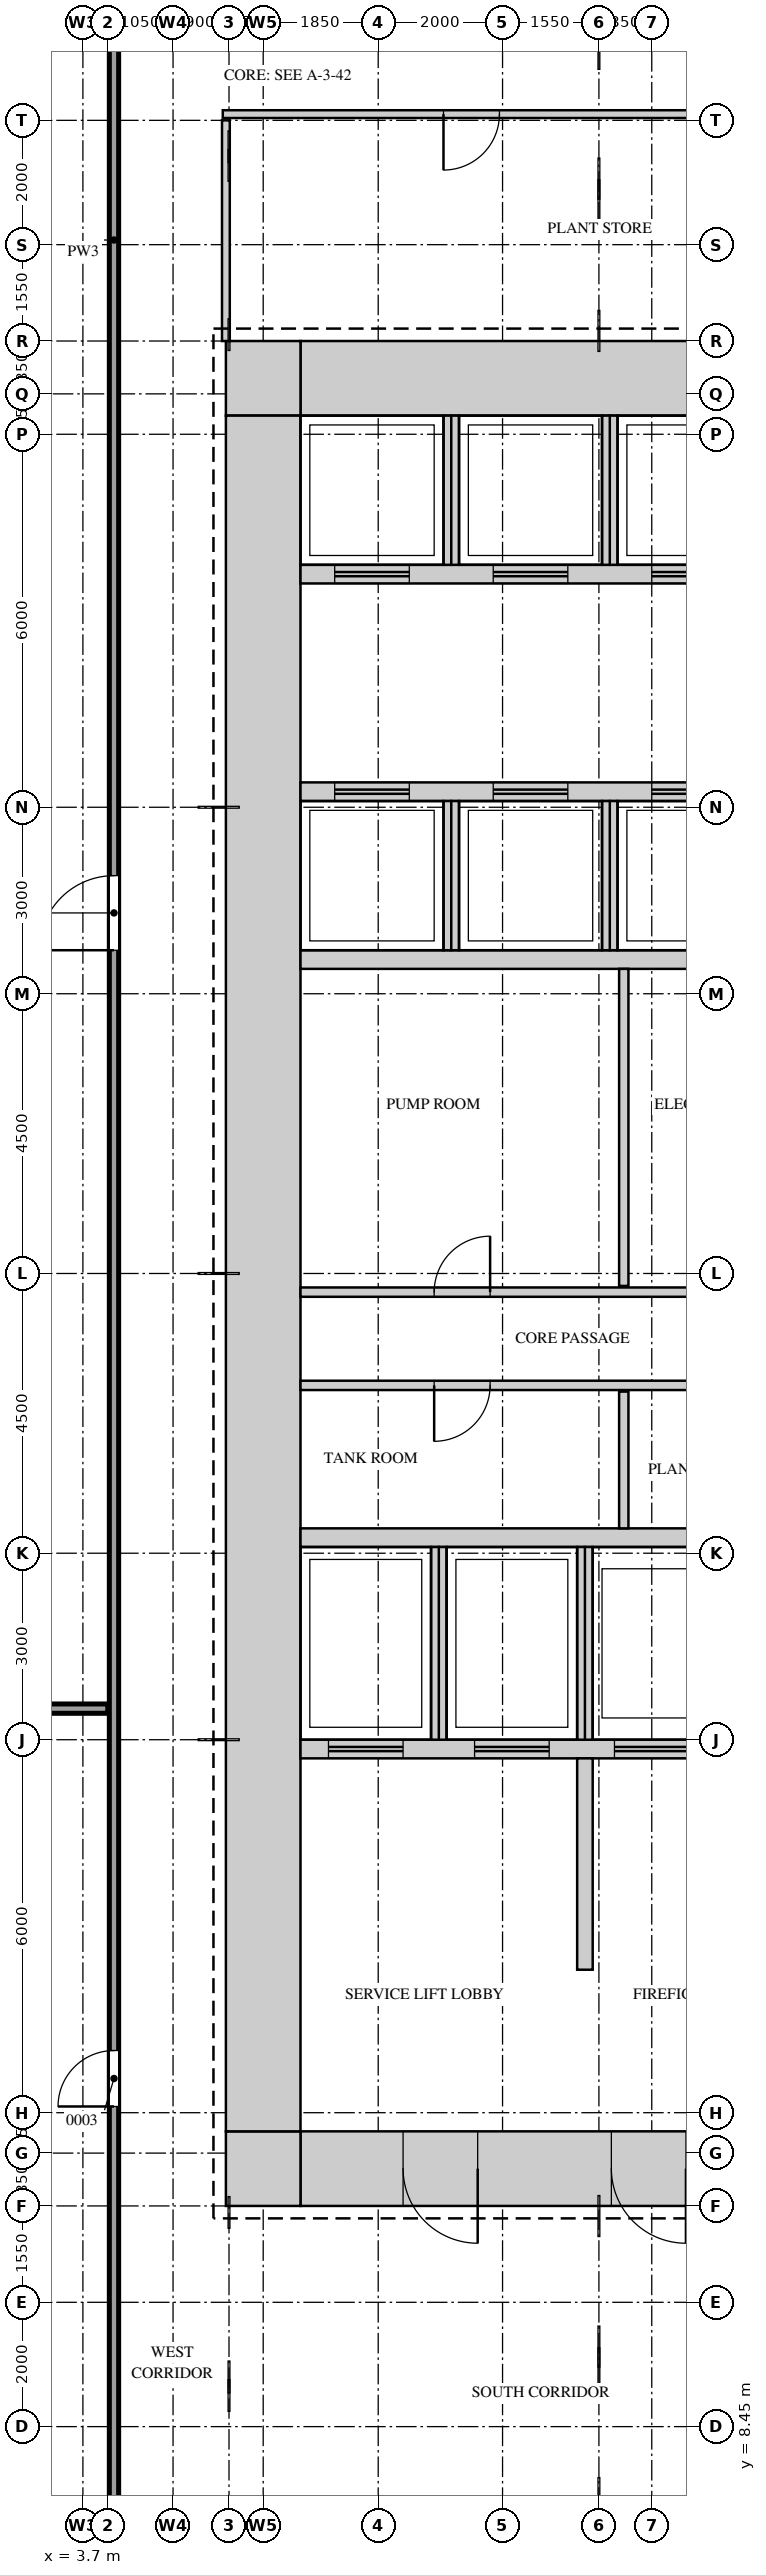
"""IFC4 building model, lengths in metres.
Left out: names, types, materials, properties, quantities, classifications, styles, units other than length and angle.
Written with IfcOpenShell. Run it as: python <this file> out.ifc"""

import sys

from ifc_helpers import new_model, si_unit, direction, frame, frame_2d, origin, place, context, subcontext, project, spatial, rectangle, extrude, source, transform, mapped, element, fill, save


model = new_model("IFC4")
c1 = context("Model", 3, precision=1e-05, world=origin(), true_north=direction((0.0, 1.0)))
c2 = subcontext(c1, "Body", "Model", "MODEL_VIEW")
j1 = project(units=[si_unit("LENGTHUNIT", "METRE"), si_unit("PLANEANGLEUNIT", "RADIAN")], contexts=[c1])
p1 = place(None, origin())
s1 = spatial("IfcSite", under=j1, at=p1, CompositionType="ELEMENT")
p2 = place(p1, origin())
s2 = spatial("IfcBuilding", under=s1, at=p2, CompositionType="ELEMENT")
p3 = place(p2, frame((0.0, 0.0, 96.0)))
s3 = spatial("IfcBuildingStorey", under=s2, at=p3, CompositionType="ELEMENT", Elevation=96.0)
m1 = source(origin(), c2, "Body", "SweptSolid", [
    extrude(rectangle(XDim=6.7, YDim=1.2, at=frame_2d((3.35, 0.0))), origin(), (0.0, 0.0, 1.0), 5.2),
])
p4 = place(p3, frame((7.2, 41.4, 0.0), z_axis=(0.0, 0.0, 1.0), x_axis=(1.0, 0.0, 0.0)))
e1 = element("IfcWall", 1, at=p4, inside=s3, PredefinedType="SHEAR", context=c2, shape_type="MappedRepresentation", body=[
    mapped(m1, transform((0.0, 0.0, 0.0))),
])
m2 = source(origin(), c2, "Body", "SweptSolid", [
    extrude(rectangle(XDim=1.2, YDim=1.2, at=frame_2d((0.6, 0.0))), origin(), (0.0, 0.0, 1.0), 5.2),
])
p5 = place(p3, frame((6.0, 41.4, 0.0), z_axis=(0.0, 0.0, 1.0), x_axis=(1.0, 0.0, 0.0)))
e2 = element("IfcWall", 2, at=p5, inside=s3, PredefinedType="SHEAR", context=c2, shape_type="MappedRepresentation", body=[
    mapped(m2, transform((0.0, 0.0, 0.0))),
])
p6 = place(p3, frame((7.2, 12.6, 0.0), z_axis=(0.0, 0.0, 1.0), x_axis=(1.0, 0.0, 0.0)))
e3 = element("IfcWall", 3, at=p6, inside=s3, PredefinedType="SHEAR", context=c2, shape_type="MappedRepresentation", body=[
    mapped(m1, transform((0.0, 0.0, 0.0))),
])
m3 = source(origin(), c2, "Body", "SweptSolid", [
    extrude(rectangle(XDim=1.2, YDim=2.1, at=frame_2d((0.6, 1.05))), frame((0.0, 0.61, 0.0), z_axis=(0.0, -1.0, 0.0), x_axis=(1.0, 0.0, 0.0)), (0.0, 0.0, 1.0), 1.22),
])
p7 = place(p6, frame((5.0, 0.0, 0.0)))
e4 = element("IfcOpeningElement", 4, at=p7, cuts=e3, PredefinedType="OPENING", context=c2, shape_type="MappedRepresentation", body=[
    mapped(m3, transform((0.0, 0.0, 0.0))),
])
p8 = place(p6, frame((1.65, 0.0, 0.0)))
e5 = element("IfcOpeningElement", 5, at=p8, cuts=e3, PredefinedType="OPENING", context=c2, shape_type="MappedRepresentation", body=[
    mapped(m3, transform((0.0, 0.0, 0.0))),
])
p9 = place(p3, frame((6.0, 12.6, 0.0), z_axis=(0.0, 0.0, 1.0), x_axis=(1.0, 0.0, 0.0)))
e6 = element("IfcWall", 6, at=p9, inside=s3, PredefinedType="SHEAR", context=c2, shape_type="MappedRepresentation", body=[
    mapped(m2, transform((0.0, 0.0, 0.0))),
])
m4 = source(origin(), c2, "Body", "SweptSolid", [
    extrude(rectangle(XDim=27.6, YDim=1.2, at=frame_2d((13.8, 0.0))), origin(), (0.0, 0.0, 1.0), 5.2),
])
p10 = place(p3, frame((6.6, 13.2, 0.0), z_axis=(0.0, 0.0, 1.0), x_axis=(0.0, 1.0, 0.0)))
e7 = element("IfcWall", 7, at=p10, inside=s3, PredefinedType="SHEAR", context=c2, shape_type="MappedRepresentation", body=[
    mapped(m4, transform((0.0, 0.0, 0.0))),
])
m5 = source(origin(), c2, "Body", "SweptSolid", [
    extrude(rectangle(XDim=13.0, YDim=0.3, at=frame_2d((6.5, 0.0))), origin(), (0.0, 0.0, 1.0), 5.2),
])
p11 = place(p3, frame((7.2, 22.75, 0.0), z_axis=(0.0, 0.0, 1.0), x_axis=(1.0, 0.0, 0.0)))
e8 = element("IfcWall", 8, at=p11, inside=s3, PredefinedType="STANDARD", context=c2, shape_type="MappedRepresentation", body=[
    mapped(m5, transform((0.0, 0.0, 0.0))),
])
m6 = source(origin(), c2, "Body", "SweptSolid", [
    extrude(rectangle(XDim=8.875, YDim=0.3, at=frame_2d((4.438, 0.0))), origin(), (0.0, 0.0, 1.0), 5.2),
])
p12 = place(p3, frame((7.2, 19.35, 0.0), z_axis=(0.0, 0.0, 1.0), x_axis=(1.0, 0.0, 0.0)))
e9 = element("IfcWall", 9, at=p12, inside=s3, PredefinedType="STANDARD", context=c2, shape_type="MappedRepresentation", body=[
    mapped(m6, transform((0.0, 0.0, 0.0))),
])
m7 = source(origin(), c2, "Body", "SweptSolid", [
    extrude(rectangle(XDim=1.2, YDim=2.1, at=frame_2d((0.6, 1.05))), frame((0.0, 0.16, 0.0), z_axis=(0.0, -1.0, 0.0), x_axis=(1.0, 0.0, 0.0)), (0.0, 0.0, 1.0), 0.32),
])
p13 = place(p12, frame((0.45, 0.0, 0.0)))
e10 = element("IfcOpeningElement", 10, at=p13, cuts=e9, PredefinedType="OPENING", context=c2, shape_type="MappedRepresentation", body=[
    mapped(m7, transform((0.0, 0.0, 0.0))),
])
p14 = place(p12, frame((2.8, 0.0, 0.0)))
e11 = element("IfcOpeningElement", 11, at=p14, cuts=e9, PredefinedType="OPENING", context=c2, shape_type="MappedRepresentation", body=[
    mapped(m7, transform((0.0, 0.0, 0.0))),
])
p15 = place(p12, frame((5.05, 0.0, 0.0)))
e12 = element("IfcOpeningElement", 12, at=p15, cuts=e9, PredefinedType="OPENING", context=c2, shape_type="MappedRepresentation", body=[
    mapped(m7, transform((0.0, 0.0, 0.0))),
])
p16 = place(p12, frame((7.2, 0.0, 0.0)))
e13 = element("IfcOpeningElement", 13, at=p16, cuts=e9, PredefinedType="OPENING", context=c2, shape_type="MappedRepresentation", body=[
    mapped(m7, transform((0.0, 0.0, 0.0))),
])
m8 = source(origin(), c2, "Body", "SweptSolid", [
    extrude(rectangle(XDim=15.6, YDim=0.3, at=frame_2d((7.8, 0.0))), origin(), (0.0, 0.0, 1.0), 5.2),
])
p17 = place(p3, frame((7.2, 32.05, 0.0), z_axis=(0.0, 0.0, 1.0), x_axis=(1.0, 0.0, 0.0)))
e14 = element("IfcWall", 14, at=p17, inside=s3, PredefinedType="STANDARD", context=c2, shape_type="MappedRepresentation", body=[
    mapped(m8, transform((0.0, 0.0, 0.0))),
])
p18 = place(p3, frame((7.2, 38.25, 0.0), z_axis=(0.0, 0.0, 1.0), x_axis=(1.0, 0.0, 0.0)))
e15 = element("IfcWall", 15, at=p18, inside=s3, PredefinedType="STANDARD", context=c2, shape_type="MappedRepresentation", body=[
    mapped(m8, transform((0.0, 0.0, 0.0))),
])
p19 = place(p18, frame((0.55, 0.0, 0.0)))
e16 = element("IfcOpeningElement", 16, at=p19, cuts=e15, PredefinedType="OPENING", context=c2, shape_type="MappedRepresentation", body=[
    mapped(m7, transform((0.0, 0.0, 0.0))),
])
p20 = place(p18, frame((3.1, 0.0, 0.0)))
e17 = element("IfcOpeningElement", 17, at=p20, cuts=e15, PredefinedType="OPENING", context=c2, shape_type="MappedRepresentation", body=[
    mapped(m7, transform((0.0, 0.0, 0.0))),
])
p21 = place(p18, frame((5.65, 0.0, 0.0)))
e18 = element("IfcOpeningElement", 18, at=p21, cuts=e15, PredefinedType="OPENING", context=c2, shape_type="MappedRepresentation", body=[
    mapped(m7, transform((0.0, 0.0, 0.0))),
])
p22 = place(p18, frame((8.2, 0.0, 0.0)))
e19 = element("IfcOpeningElement", 19, at=p22, cuts=e15, PredefinedType="OPENING", context=c2, shape_type="MappedRepresentation", body=[
    mapped(m7, transform((0.0, 0.0, 0.0))),
])
p23 = place(p3, frame((7.2, 34.75, 0.0), z_axis=(0.0, 0.0, 1.0), x_axis=(1.0, 0.0, 0.0)))
e20 = element("IfcWall", 20, at=p23, inside=s3, PredefinedType="STANDARD", context=c2, shape_type="MappedRepresentation", body=[
    mapped(m8, transform((0.0, 0.0, 0.0))),
])
p24 = place(p23, frame((0.55, 0.0, 0.0)))
e21 = element("IfcOpeningElement", 21, at=p24, cuts=e20, PredefinedType="OPENING", context=c2, shape_type="MappedRepresentation", body=[
    mapped(m7, transform((0.0, 0.0, 0.0))),
])
p25 = place(p23, frame((3.1, 0.0, 0.0)))
e22 = element("IfcOpeningElement", 22, at=p25, cuts=e20, PredefinedType="OPENING", context=c2, shape_type="MappedRepresentation", body=[
    mapped(m7, transform((0.0, 0.0, 0.0))),
])
p26 = place(p23, frame((5.65, 0.0, 0.0)))
e23 = element("IfcOpeningElement", 23, at=p26, cuts=e20, PredefinedType="OPENING", context=c2, shape_type="MappedRepresentation", body=[
    mapped(m7, transform((0.0, 0.0, 0.0))),
])
p27 = place(p23, frame((8.2, 0.0, 0.0)))
e24 = element("IfcOpeningElement", 24, at=p27, cuts=e20, PredefinedType="OPENING", context=c2, shape_type="MappedRepresentation", body=[
    mapped(m7, transform((0.0, 0.0, 0.0))),
])
m9 = source(origin(), c2, "Body", "SweptSolid", [
    extrude(rectangle(XDim=3.1, YDim=0.25, at=frame_2d((1.55, 0.0))), origin(), (0.0, 0.0, 1.0), 5.2),
])
for number, where, z_axis, x_axis in (
    (25, (9.425, 19.5, 0.0), (0.0, 0.0, 1.0), (0.0, 1.0, 0.0)),
    (26, (11.775, 19.5, 0.0), (0.0, 0.0, 1.0), (0.0, 1.0, 0.0)),
):
    element("IfcWall", number, at=place(p3, frame(where, z_axis=z_axis, x_axis=x_axis)), inside=s3, PredefinedType="STANDARD", context=c2, shape_type="MappedRepresentation", body=[
        mapped(m9, transform((0.0, 0.0, 0.0))),
    ])
m10 = source(origin(), c2, "Body", "SweptSolid", [
    extrude(rectangle(XDim=2.4, YDim=0.25, at=frame_2d((1.2, 0.0))), origin(), (0.0, 0.0, 1.0), 5.2),
])
for number, where, z_axis, x_axis in (
    (27, (9.625, 38.4, 0.0), (0.0, 0.0, 1.0), (0.0, 1.0, 0.0)),
    (28, (12.175, 38.4, 0.0), (0.0, 0.0, 1.0), (0.0, 1.0, 0.0)),
    (29, (9.625, 32.2, 0.0), (0.0, 0.0, 1.0), (0.0, 1.0, 0.0)),
    (30, (12.175, 32.2, 0.0), (0.0, 0.0, 1.0), (0.0, 1.0, 0.0)),
):
    element("IfcWall", number, at=place(p3, frame(where, z_axis=z_axis, x_axis=x_axis)), inside=s3, PredefinedType="STANDARD", context=c2, shape_type="MappedRepresentation", body=[
        mapped(m10, transform((0.0, 0.0, 0.0))),
    ])
m11 = source(origin(), c2, "Body", "SweptSolid", [
    extrude(rectangle(XDim=3.4, YDim=0.25, at=frame_2d((1.7, 0.0))), origin(), (0.0, 0.0, 1.0), 5.2),
])
p28 = place(p3, frame((11.775, 15.8, 0.0), z_axis=(0.0, 0.0, 1.0), x_axis=(0.0, 1.0, 0.0)))
e31 = element("IfcWall", 31, at=p28, inside=s3, PredefinedType="STANDARD", context=c2, shape_type="MappedRepresentation", body=[
    mapped(m11, transform((0.0, 0.0, 0.0))),
])
m12 = source(origin(), c2, "Body", "SweptSolid", [
    extrude(rectangle(XDim=53.7, YDim=0.15, at=frame_2d((26.85, 0.0))), origin(), (0.0, 0.0, 1.0), 5.2),
])
p29 = place(p3, frame((4.2, 0.15, 0.0), z_axis=(0.0, 0.0, 1.0), x_axis=(0.0, 1.0, 0.0)))
e32 = element("IfcWall", 32, at=p29, inside=s3, PredefinedType="PARTITIONING", context=c2, shape_type="MappedRepresentation", body=[
    mapped(m12, transform((0.0, 0.0, 0.0))),
])
m13 = source(origin(), c2, "Body", "SweptSolid", [
    extrude(rectangle(XDim=0.9, YDim=2.1, at=frame_2d((0.45, 1.05))), frame((0.0, 0.085, 0.0), z_axis=(0.0, -1.0, 0.0), x_axis=(1.0, 0.0, 0.0)), (0.0, 0.0, 1.0), 0.17),
])
p30 = place(p29, frame((13.45, 0.0, 0.0)))
e33 = element("IfcOpeningElement", 33, at=p30, cuts=e32, PredefinedType="OPENING", context=c2, shape_type="MappedRepresentation", body=[
    mapped(m13, transform((0.0, 0.0, 0.0))),
])
m14 = source(origin(), c2, "Body", "SweptSolid", [
    extrude(rectangle(XDim=1.2, YDim=2.1, at=frame_2d((0.6, 1.05))), frame((0.0, 0.085, 0.0), z_axis=(0.0, -1.0, 0.0), x_axis=(1.0, 0.0, 0.0)), (0.0, 0.0, 1.0), 0.17),
])
p31 = place(p29, frame((32.05, 0.0, 0.0)))
e34 = element("IfcOpeningElement", 34, at=p31, cuts=e32, PredefinedType="OPENING", context=c2, shape_type="MappedRepresentation", body=[
    mapped(m14, transform((0.0, 0.0, 0.0))),
])
m15 = source(origin(), c2, "Body", "SweptSolid", [
    extrude(rectangle(XDim=3.95, YDim=0.15, at=frame_2d((1.975, 0.0))), origin(), (0.0, 0.0, 1.0), 5.2),
])
p32 = place(p3, frame((0.15, 20.0, 0.0), z_axis=(0.0, 0.0, 1.0), x_axis=(1.0, 0.0, 0.0)))
e35 = element("IfcWall", 35, at=p32, inside=s3, PredefinedType="PARTITIONING", context=c2, shape_type="MappedRepresentation", body=[
    mapped(m15, transform((0.0, 0.0, 0.0))),
])
m16 = source(origin(), c2, "Body", "SweptSolid", [
    extrude(rectangle(XDim=2.2, YDim=0.15, at=frame_2d((1.1, 0.0))), origin(), (0.0, 0.0, 1.0), 5.2),
])
p33 = place(p3, frame((12.4, 22.9, 0.0), z_axis=(0.0, 0.0, 1.0), x_axis=(0.0, 1.0, 0.0)))
e36 = element("IfcWall", 36, at=p33, inside=s3, PredefinedType="PARTITIONING", context=c2, shape_type="MappedRepresentation", body=[
    mapped(m16, transform((0.0, 0.0, 0.0))),
])
m17 = source(origin(), c2, "Body", "SweptSolid", [
    extrude(rectangle(XDim=15.6, YDim=0.15, at=frame_2d((7.8, 0.0))), origin(), (0.0, 0.0, 1.0), 5.2),
])
p34 = place(p3, frame((7.2, 25.2, 0.0), z_axis=(0.0, 0.0, 1.0), x_axis=(1.0, 0.0, 0.0)))
e37 = element("IfcWall", 37, at=p34, inside=s3, PredefinedType="PARTITIONING", context=c2, shape_type="MappedRepresentation", body=[
    mapped(m17, transform((0.0, 0.0, 0.0))),
])
p35 = place(p34, frame((2.15, 0.0, 0.0)))
e38 = element("IfcOpeningElement", 38, at=p35, cuts=e37, PredefinedType="OPENING", context=c2, shape_type="MappedRepresentation", body=[
    mapped(m13, transform((0.0, 0.0, 0.0))),
])
p36 = place(p34, frame((7.35, 0.0, 0.0)))
e39 = element("IfcOpeningElement", 39, at=p36, cuts=e37, PredefinedType="OPENING", context=c2, shape_type="MappedRepresentation", body=[
    mapped(m13, transform((0.0, 0.0, 0.0))),
])
p37 = place(p34, frame((12.55, 0.0, 0.0)))
e40 = element("IfcOpeningElement", 40, at=p37, cuts=e37, PredefinedType="OPENING", context=c2, shape_type="MappedRepresentation", body=[
    mapped(m13, transform((0.0, 0.0, 0.0))),
])
p38 = place(p3, frame((7.2, 26.7, 0.0), z_axis=(0.0, 0.0, 1.0), x_axis=(1.0, 0.0, 0.0)))
e41 = element("IfcWall", 41, at=p38, inside=s3, PredefinedType="PARTITIONING", context=c2, shape_type="MappedRepresentation", body=[
    mapped(m17, transform((0.0, 0.0, 0.0))),
])
p39 = place(p38, frame((2.15, 0.0, 0.0)))
e42 = element("IfcOpeningElement", 42, at=p39, cuts=e41, PredefinedType="OPENING", context=c2, shape_type="MappedRepresentation", body=[
    mapped(m13, transform((0.0, 0.0, 0.0))),
])
p40 = place(p38, frame((7.35, 0.0, 0.0)))
e43 = element("IfcOpeningElement", 43, at=p40, cuts=e41, PredefinedType="OPENING", context=c2, shape_type="MappedRepresentation", body=[
    mapped(m13, transform((0.0, 0.0, 0.0))),
])
p41 = place(p38, frame((12.55, 0.0, 0.0)))
e44 = element("IfcOpeningElement", 44, at=p41, cuts=e41, PredefinedType="OPENING", context=c2, shape_type="MappedRepresentation", body=[
    mapped(m13, transform((0.0, 0.0, 0.0))),
])
m18 = source(origin(), c2, "Body", "SweptSolid", [
    extrude(rectangle(XDim=5.1, YDim=0.15, at=frame_2d((2.55, 0.0))), origin(), (0.0, 0.0, 1.0), 5.2),
])
p42 = place(p3, frame((12.4, 26.8, 0.0), z_axis=(0.0, 0.0, 1.0), x_axis=(0.0, 1.0, 0.0)))
e45 = element("IfcWall", 45, at=p42, inside=s3, PredefinedType="PARTITIONING", context=c2, shape_type="MappedRepresentation", body=[
    mapped(m18, transform((0.0, 0.0, 0.0))),
])
m19 = source(origin(), c2, "Body", "SweptSolid", [
    extrude(rectangle(XDim=3.55, YDim=0.125, at=frame_2d((1.775, 0.0))), origin(), (0.0, 0.0, 1.0), 5.2),
])
p43 = place(p3, frame((6.0, 42.0, 0.0), z_axis=(0.0, 0.0, 1.0), x_axis=(0.0, 1.0, 0.0)))
e46 = element("IfcWall", 46, at=p43, inside=s3, PredefinedType="PARTITIONING", context=c2, shape_type="MappedRepresentation", body=[
    mapped(m19, transform((0.0, 0.0, 0.0))),
])
m20 = source(origin(), c2, "Body", "SweptSolid", [
    extrude(rectangle(XDim=7.95, YDim=0.125, at=frame_2d((3.975, 0.0))), origin(), (0.0, 0.0, 1.0), 5.2),
])
p44 = place(p3, frame((5.95, 45.65, 0.0), z_axis=(0.0, 0.0, 1.0), x_axis=(1.0, 0.0, 0.0)))
e47 = element("IfcWall", 47, at=p44, inside=s3, PredefinedType="PARTITIONING", context=c2, shape_type="MappedRepresentation", body=[
    mapped(m20, transform((0.0, 0.0, 0.0))),
])
m21 = source(origin(), c2, "Body", "SweptSolid", [
    extrude(rectangle(XDim=0.9, YDim=2.1, at=frame_2d((0.45, 1.05))), frame((0.0, 0.073, 0.0), z_axis=(0.0, -1.0, 0.0), x_axis=(1.0, 0.0, 0.0)), (0.0, 0.0, 1.0), 0.145),
])
p45 = place(p44, frame((3.55, 0.0, 0.0)))
e48 = element("IfcOpeningElement", 48, at=p45, cuts=e47, PredefinedType="OPENING", context=c2, shape_type="MappedRepresentation", body=[
    mapped(m21, transform((0.0, 0.0, 0.0))),
])
m22 = source(origin(), c2, "Body", "SweptSolid", [
    extrude(rectangle(XDim=0.9, YDim=2.1, at=frame_2d((0.45, 1.05))), frame((0.0, 0.025, 0.0), z_axis=(0.0, -1.0, 0.0), x_axis=(1.0, 0.0, 0.0)), (0.0, 0.0, 1.0), 0.05),
])
p46 = place(p39, origin())
e49 = element("IfcDoor", 49, at=p46, inside=s3, OperationType="SINGLE_SWING_LEFT", PredefinedType="DOOR", context=c2, shape_type="MappedRepresentation", body=[
    mapped(m22, transform((0.0, 0.0, 0.0))),
])
fill(e42, e49)
p47 = place(p35, origin())
e50 = element("IfcDoor", 50, at=p47, inside=s3, OperationType="SINGLE_SWING_LEFT", PredefinedType="DOOR", context=c2, shape_type="MappedRepresentation", body=[
    mapped(m22, transform((0.0, 0.0, 0.0))),
])
fill(e38, e50)
m23 = source(origin(), c2, "Body", "SweptSolid", [
    extrude(rectangle(XDim=1.2, YDim=2.1, at=frame_2d((0.6, 1.05))), frame((0.0, 0.55, 0.0), z_axis=(0.0, -1.0, 0.0), x_axis=(1.0, 0.0, 0.0)), (0.0, 0.0, 1.0), 1.1),
])
p48 = place(p7, origin())
e51 = element("IfcDoor", 51, at=p48, inside=s3, OperationType="SINGLE_SWING_RIGHT", PredefinedType="DOOR", context=c2, shape_type="MappedRepresentation", body=[
    mapped(m23, transform((0.0, 0.0, 0.0))),
])
fill(e4, e51)
p49 = place(p8, origin())
e52 = element("IfcDoor", 52, at=p49, inside=s3, OperationType="SINGLE_SWING_RIGHT", PredefinedType="DOOR", context=c2, shape_type="MappedRepresentation", body=[
    mapped(m23, transform((0.0, 0.0, 0.0))),
])
fill(e5, e52)
p50 = place(p45, origin())
e53 = element("IfcDoor", 53, at=p50, inside=s3, OperationType="SINGLE_SWING_LEFT", PredefinedType="DOOR", context=c2, shape_type="MappedRepresentation", body=[
    mapped(m22, transform((0.0, 0.0, 0.0))),
])
fill(e48, e53)
p51 = place(p30, origin())
e54 = element("IfcDoor", 54, at=p51, inside=s3, OperationType="SINGLE_SWING_RIGHT", PredefinedType="DOOR", context=c2, shape_type="MappedRepresentation", body=[
    mapped(m22, transform((0.0, 0.0, 0.0))),
])
fill(e33, e54)
m24 = source(origin(), c2, "Body", "SweptSolid", [
    extrude(rectangle(XDim=1.2, YDim=2.1, at=frame_2d((0.6, 1.05))), frame((0.0, 0.025, 0.0), z_axis=(0.0, -1.0, 0.0), x_axis=(1.0, 0.0, 0.0)), (0.0, 0.0, 1.0), 0.05),
])
p52 = place(p31, origin())
e55 = element("IfcDoor", 55, at=p52, inside=s3, OperationType="SINGLE_SWING_RIGHT", PredefinedType="DOOR", context=c2, shape_type="MappedRepresentation", body=[
    mapped(m24, transform((0.0, 0.0, 0.0))),
])
fill(e34, e55)
p53 = place(p24, origin())
e56 = element("IfcDoor", 56, at=p53, inside=s3, OperationType="DOUBLE_DOOR_SLIDING", PredefinedType="DOOR", context=c2, shape_type="MappedRepresentation", body=[
    mapped(m24, transform((0.0, 0.0, 0.0))),
])
fill(e21, e56)
p54 = place(p25, origin())
e57 = element("IfcDoor", 57, at=p54, inside=s3, OperationType="DOUBLE_DOOR_SLIDING", PredefinedType="DOOR", context=c2, shape_type="MappedRepresentation", body=[
    mapped(m24, transform((0.0, 0.0, 0.0))),
])
fill(e22, e57)
p55 = place(p26, origin())
e58 = element("IfcDoor", 58, at=p55, inside=s3, OperationType="DOUBLE_DOOR_SLIDING", PredefinedType="DOOR", context=c2, shape_type="MappedRepresentation", body=[
    mapped(m24, transform((0.0, 0.0, 0.0))),
])
fill(e23, e58)
p56 = place(p19, origin())
e59 = element("IfcDoor", 59, at=p56, inside=s3, OperationType="DOUBLE_DOOR_SLIDING", PredefinedType="DOOR", context=c2, shape_type="MappedRepresentation", body=[
    mapped(m24, transform((0.0, 0.0, 0.0))),
])
fill(e16, e59)
p57 = place(p20, origin())
e60 = element("IfcDoor", 60, at=p57, inside=s3, OperationType="DOUBLE_DOOR_SLIDING", PredefinedType="DOOR", context=c2, shape_type="MappedRepresentation", body=[
    mapped(m24, transform((0.0, 0.0, 0.0))),
])
fill(e17, e60)
p58 = place(p21, origin())
e61 = element("IfcDoor", 61, at=p58, inside=s3, OperationType="DOUBLE_DOOR_SLIDING", PredefinedType="DOOR", context=c2, shape_type="MappedRepresentation", body=[
    mapped(m24, transform((0.0, 0.0, 0.0))),
])
fill(e18, e61)
p59 = place(p13, origin())
e62 = element("IfcDoor", 62, at=p59, inside=s3, OperationType="DOUBLE_DOOR_SLIDING", PredefinedType="DOOR", context=c2, shape_type="MappedRepresentation", body=[
    mapped(m24, transform((0.0, 0.0, 0.0))),
])
fill(e10, e62)
p60 = place(p14, origin())
e63 = element("IfcDoor", 63, at=p60, inside=s3, OperationType="DOUBLE_DOOR_SLIDING", PredefinedType="DOOR", context=c2, shape_type="MappedRepresentation", body=[
    mapped(m24, transform((0.0, 0.0, 0.0))),
])
fill(e11, e63)
p61 = place(p15, origin())
e64 = element("IfcDoor", 64, at=p61, inside=s3, OperationType="DOUBLE_DOOR_SLIDING", PredefinedType="DOOR", context=c2, shape_type="MappedRepresentation", body=[
    mapped(m24, transform((0.0, 0.0, 0.0))),
])
fill(e12, e64)
save(model, sys.argv[1])
